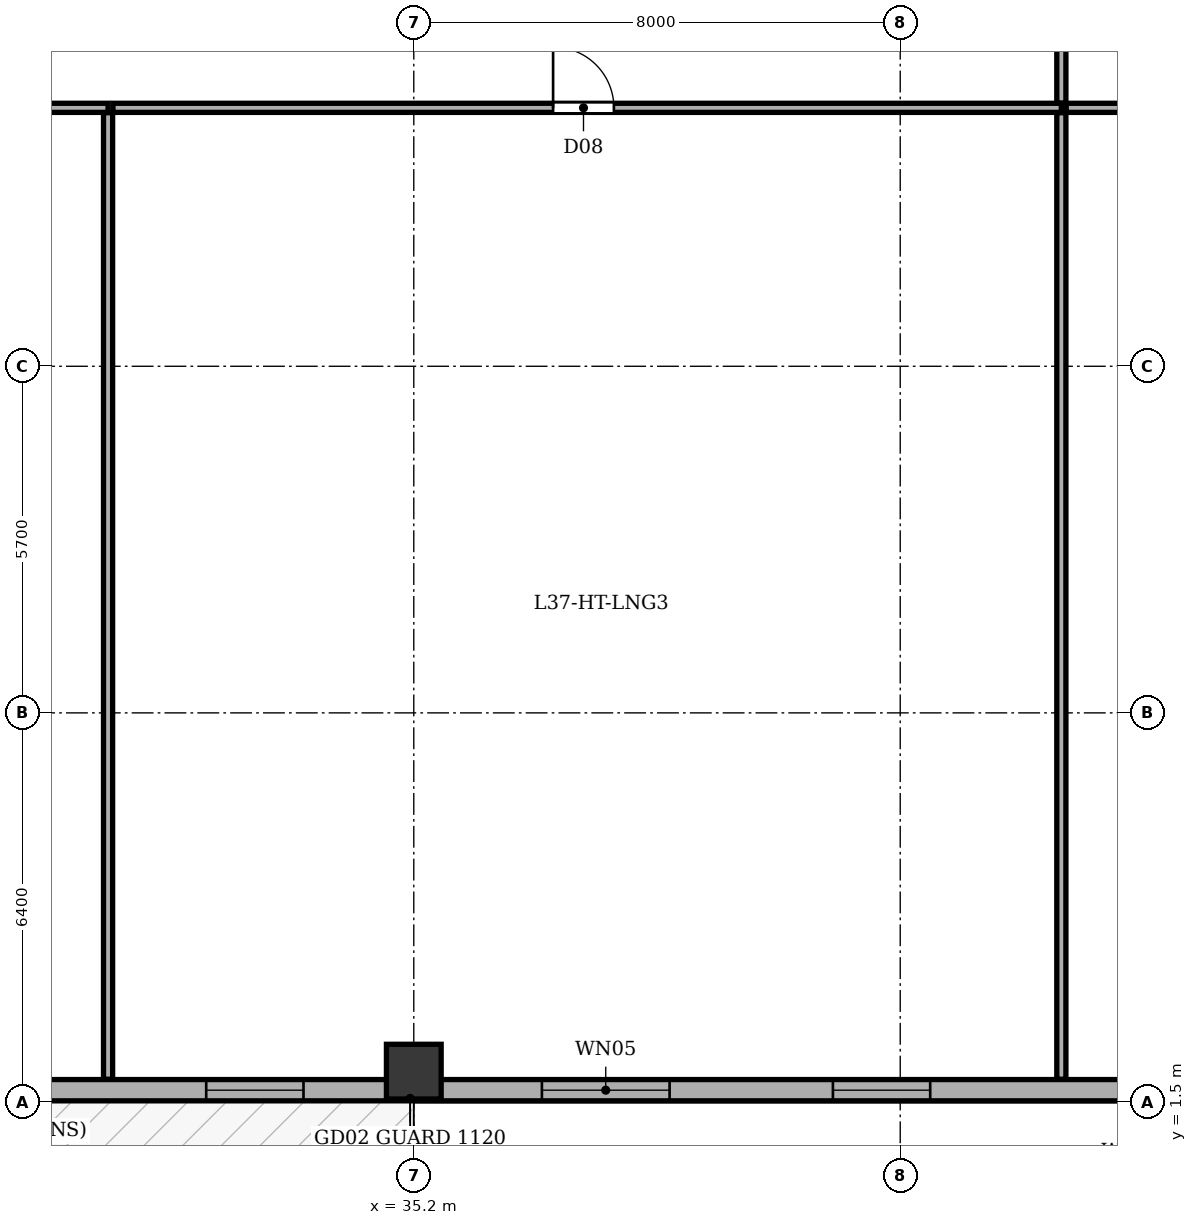
"""IFC4 building model, lengths in metres.
Left out: names, types, materials, properties, quantities, classifications, styles, units other than length and angle.
Written with IfcOpenShell. Run it as: python <this file> out.ifc"""

import sys

from ifc_helpers import new_model, si_unit, direction, frame, frame_2d, origin, origin_2d, place, context, subcontext, project, spatial, rectangle, extrude, element, fill, save


model = new_model("IFC4")
c1 = context("Model", 3, precision=1e-05, world=origin(), true_north=direction((0.0, 1.0)))
c2 = subcontext(c1, "Body", "Model", "MODEL_VIEW")
j1 = project(units=[si_unit("LENGTHUNIT", "METRE"), si_unit("PLANEANGLEUNIT", "RADIAN")], contexts=[c1])
p1 = place(None, origin())
s1 = spatial("IfcSite", under=j1, at=p1, CompositionType="ELEMENT")
p2 = place(p1, origin())
s2 = spatial("IfcBuilding", under=s1, at=p2, CompositionType="ELEMENT")
p3 = place(p2, frame((0.0, 0.0, 148.3)))
s3 = spatial("IfcBuildingStorey", under=s2, at=p3, CompositionType="ELEMENT", Elevation=148.3)
p4 = place(p3, frame((35.2, 2.0, 0.0), z_axis=(0.0, 0.0, 1.0), x_axis=(1.0, 0.0, 0.0)))
e1 = element("IfcColumn", 1, at=p4, inside=s3, PredefinedType="COLUMN", context=c2, shape_type="SweptSolid", body=[
    extrude(rectangle(XDim=0.9, YDim=0.9, at=origin_2d()), origin(), (0.0, 0.0, 1.0), 3.5),
])
p5 = place(p3, frame((50.7, 1.695, 0.0), z_axis=(0.0, 0.0, 1.0), x_axis=(-1.0, 0.0, 0.0)))
e2 = element("IfcWall", 2, at=p5, inside=s3, PredefinedType="STANDARD", context=c2, shape_type="SweptSolid", body=[
    extrude(rectangle(XDim=35.0, YDim=0.35, at=frame_2d((17.5, 0.0))), origin(), (0.0, 0.0, 1.0), 2.785),
])
p6 = place(p5, frame((26.0, 0.0, 0.0)))
e3 = element("IfcOpeningElement", 3, at=p6, cuts=e2, PredefinedType="OPENING", context=c2, shape_type="SweptSolid", body=[
    extrude(rectangle(XDim=1.0, YDim=2.02, at=frame_2d((0.5, 1.01))), frame((0.0, 0.185, 0.0), z_axis=(0.0, -1.0, 0.0), x_axis=(1.0, 0.0, 0.0)), (0.0, 0.0, 1.0), 0.37),
])
p7 = place(p5, frame((1.763, 0.0, 0.75)))
e4 = element("IfcOpeningElement", 4, at=p7, cuts=e2, PredefinedType="OPENING", context=c2, shape_type="SweptSolid", body=[
    extrude(rectangle(XDim=1.6, YDim=1.75, at=frame_2d((0.8, 0.875))), frame((0.0, 0.185, 0.0), z_axis=(0.0, -1.0, 0.0), x_axis=(1.0, 0.0, 0.0)), (0.0, 0.0, 1.0), 0.37),
])
p8 = place(p5, frame((7.007, 0.0, 0.75)))
e5 = element("IfcOpeningElement", 5, at=p8, cuts=e2, PredefinedType="OPENING", context=c2, shape_type="SweptSolid", body=[
    extrude(rectangle(XDim=1.6, YDim=1.75, at=frame_2d((0.8, 0.875))), frame((0.0, 0.185, 0.0), z_axis=(0.0, -1.0, 0.0), x_axis=(1.0, 0.0, 0.0)), (0.0, 0.0, 1.0), 0.37),
])
p9 = place(p5, frame((11.293, 0.0, 0.75)))
e6 = element("IfcOpeningElement", 6, at=p9, cuts=e2, PredefinedType="OPENING", context=c2, shape_type="SweptSolid", body=[
    extrude(rectangle(XDim=2.1, YDim=1.75, at=frame_2d((1.05, 0.875))), frame((0.0, 0.185, 0.0), z_axis=(0.0, -1.0, 0.0), x_axis=(1.0, 0.0, 0.0)), (0.0, 0.0, 1.0), 0.37),
])
p10 = place(p5, frame((17.314, 0.0, 0.75)))
e7 = element("IfcOpeningElement", 7, at=p10, cuts=e2, PredefinedType="OPENING", context=c2, shape_type="SweptSolid", body=[
    extrude(rectangle(XDim=1.6, YDim=1.75, at=frame_2d((0.8, 0.875))), frame((0.0, 0.185, 0.0), z_axis=(0.0, -1.0, 0.0), x_axis=(1.0, 0.0, 0.0)), (0.0, 0.0, 1.0), 0.37),
])
p11 = place(p5, frame((31.613, 0.0, 0.75)))
e8 = element("IfcOpeningElement", 8, at=p11, cuts=e2, PredefinedType="OPENING", context=c2, shape_type="SweptSolid", body=[
    extrude(rectangle(XDim=1.6, YDim=1.75, at=frame_2d((0.8, 0.875))), frame((0.0, 0.185, 0.0), z_axis=(0.0, -1.0, 0.0), x_axis=(1.0, 0.0, 0.0)), (0.0, 0.0, 1.0), 0.37),
])
p12 = place(p3, frame((24.673, 17.85, 0.0), z_axis=(0.0, 0.0, 1.0), x_axis=(1.0, 0.0, 0.0)))
e9 = element("IfcWall", 9, at=p12, inside=s3, PredefinedType="PARTITIONING", context=c2, shape_type="SweptSolid", body=[
    extrude(rectangle(XDim=5.5, YDim=0.15, at=frame_2d((2.75, 0.0))), origin(), (0.0, 0.0, 1.0), 3.2),
])
p13 = place(p12, frame((2.27, 0.0, 0.0)))
e10 = element("IfcOpeningElement", 10, at=p13, cuts=e9, PredefinedType="OPENING", context=c2, shape_type="SweptSolid", body=[
    extrude(rectangle(XDim=0.95, YDim=2.1, at=frame_2d((0.475, 1.05))), frame((0.0, 0.085, 0.0), z_axis=(0.0, -1.0, 0.0), x_axis=(1.0, 0.0, 0.0)), (0.0, 0.0, 1.0), 0.17),
])
p14 = place(p3, frame((30.172, 1.875, 0.0), z_axis=(0.0, 0.0, 1.0), x_axis=(0.0, 1.0, 0.0)))
e11 = element("IfcWall", 11, at=p14, inside=s3, PredefinedType="PARTITIONING", context=c2, shape_type="SweptSolid", body=[
    extrude(rectangle(XDim=15.895, YDim=0.15, at=frame_2d((7.948, 0.0))), origin(), (0.0, 0.0, 1.0), 3.2),
])
p15 = place(p3, frame((30.252, 17.85, 0.0), z_axis=(0.0, 0.0, 1.0), x_axis=(1.0, 0.0, 0.0)))
e12 = element("IfcWall", 12, at=p15, inside=s3, PredefinedType="PARTITIONING", context=c2, shape_type="SweptSolid", body=[
    extrude(rectangle(XDim=15.598, YDim=0.15, at=frame_2d((7.799, 0.0))), origin(), (0.0, 0.0, 1.0), 3.2),
])
p16 = place(p15, frame((7.239, 0.0, 0.0)))
e13 = element("IfcOpeningElement", 13, at=p16, cuts=e12, PredefinedType="OPENING", context=c2, shape_type="SweptSolid", body=[
    extrude(rectangle(XDim=1.0, YDim=2.1, at=frame_2d((0.5, 1.05))), frame((0.0, 0.085, 0.0), z_axis=(0.0, -1.0, 0.0), x_axis=(1.0, 0.0, 0.0)), (0.0, 0.0, 1.0), 0.17),
])
p17 = place(p3, frame((45.85, 1.875, 0.0), z_axis=(0.0, 0.0, 1.0), x_axis=(0.0, 1.0, 0.0)))
e14 = element("IfcWall", 14, at=p17, inside=s3, PredefinedType="PARTITIONING", context=c2, shape_type="SweptSolid", body=[
    extrude(rectangle(XDim=15.895, YDim=0.15, at=frame_2d((7.948, 0.0))), origin(), (0.0, 0.0, 1.0), 3.2),
])
p18 = place(p3, frame((45.93, 17.85, 0.0), z_axis=(0.0, 0.0, 1.0), x_axis=(1.0, 0.0, 0.0)))
e15 = element("IfcWall", 15, at=p18, inside=s3, PredefinedType="PARTITIONING", context=c2, shape_type="SweptSolid", body=[
    extrude(rectangle(XDim=9.395, YDim=0.15, at=frame_2d((4.698, 0.0))), origin(), (0.0, 0.0, 1.0), 3.2),
])
p19 = place(p3, frame((45.85, 17.93, 0.0), z_axis=(0.0, 0.0, 1.0), x_axis=(0.0, 1.0, 0.0)))
e16 = element("IfcWall", 16, at=p19, inside=s3, PredefinedType="PARTITIONING", context=c2, shape_type="SweptSolid", body=[
    extrude(rectangle(XDim=18.54, YDim=0.15, at=frame_2d((9.27, 0.0))), origin(), (0.0, 0.0, 1.0), 3.2),
])
p20 = place(p19, frame((8.79, 0.0, 0.0)))
e17 = element("IfcOpeningElement", 17, at=p20, cuts=e16, PredefinedType="OPENING", context=c2, shape_type="SweptSolid", body=[
    extrude(rectangle(XDim=0.95, YDim=2.1, at=frame_2d((0.475, 1.05))), frame((0.0, 0.085, 0.0), z_axis=(0.0, -1.0, 0.0), x_axis=(1.0, 0.0, 0.0)), (0.0, 0.0, 1.0), 0.17),
])
p21 = place(p8, origin())
e18 = element("IfcWindow", 18, at=p21, inside=s3, PartitioningType="SINGLE_PANEL", PredefinedType="WINDOW", context=c2, shape_type="SweptSolid", body=[
    extrude(rectangle(XDim=1.6, YDim=1.75, at=frame_2d((0.8, 0.875))), frame((0.0, -0.01, 0.0), z_axis=(0.0, -1.0, 0.0), x_axis=(1.0, 0.0, 0.0)), (0.0, 0.0, 1.0), 0.06),
])
fill(e5, e18)
p22 = place(p9, origin())
e19 = element("IfcWindow", 19, at=p22, inside=s3, PartitioningType="SINGLE_PANEL", PredefinedType="WINDOW", context=c2, shape_type="SweptSolid", body=[
    extrude(rectangle(XDim=2.1, YDim=1.75, at=frame_2d((1.05, 0.875))), frame((0.0, -0.01, 0.0), z_axis=(0.0, -1.0, 0.0), x_axis=(1.0, 0.0, 0.0)), (0.0, 0.0, 1.0), 0.06),
])
fill(e6, e19)
p23 = place(p10, origin())
e20 = element("IfcWindow", 20, at=p23, inside=s3, PartitioningType="SINGLE_PANEL", PredefinedType="WINDOW", context=c2, shape_type="SweptSolid", body=[
    extrude(rectangle(XDim=1.6, YDim=1.75, at=frame_2d((0.8, 0.875))), frame((0.0, -0.01, 0.0), z_axis=(0.0, -1.0, 0.0), x_axis=(1.0, 0.0, 0.0)), (0.0, 0.0, 1.0), 0.06),
])
fill(e7, e20)
p24 = place(p16, origin())
e21 = element("IfcDoor", 21, at=p24, inside=s3, OperationType="SINGLE_SWING_LEFT", PredefinedType="DOOR", context=c2, shape_type="SweptSolid", body=[
    extrude(rectangle(XDim=1.0, YDim=2.1, at=frame_2d((0.5, 1.05))), frame((0.0, 0.025, 0.0), z_axis=(0.0, -1.0, 0.0), x_axis=(1.0, 0.0, 0.0)), (0.0, 0.0, 1.0), 0.05),
])
fill(e13, e21)
save(model, sys.argv[1])
